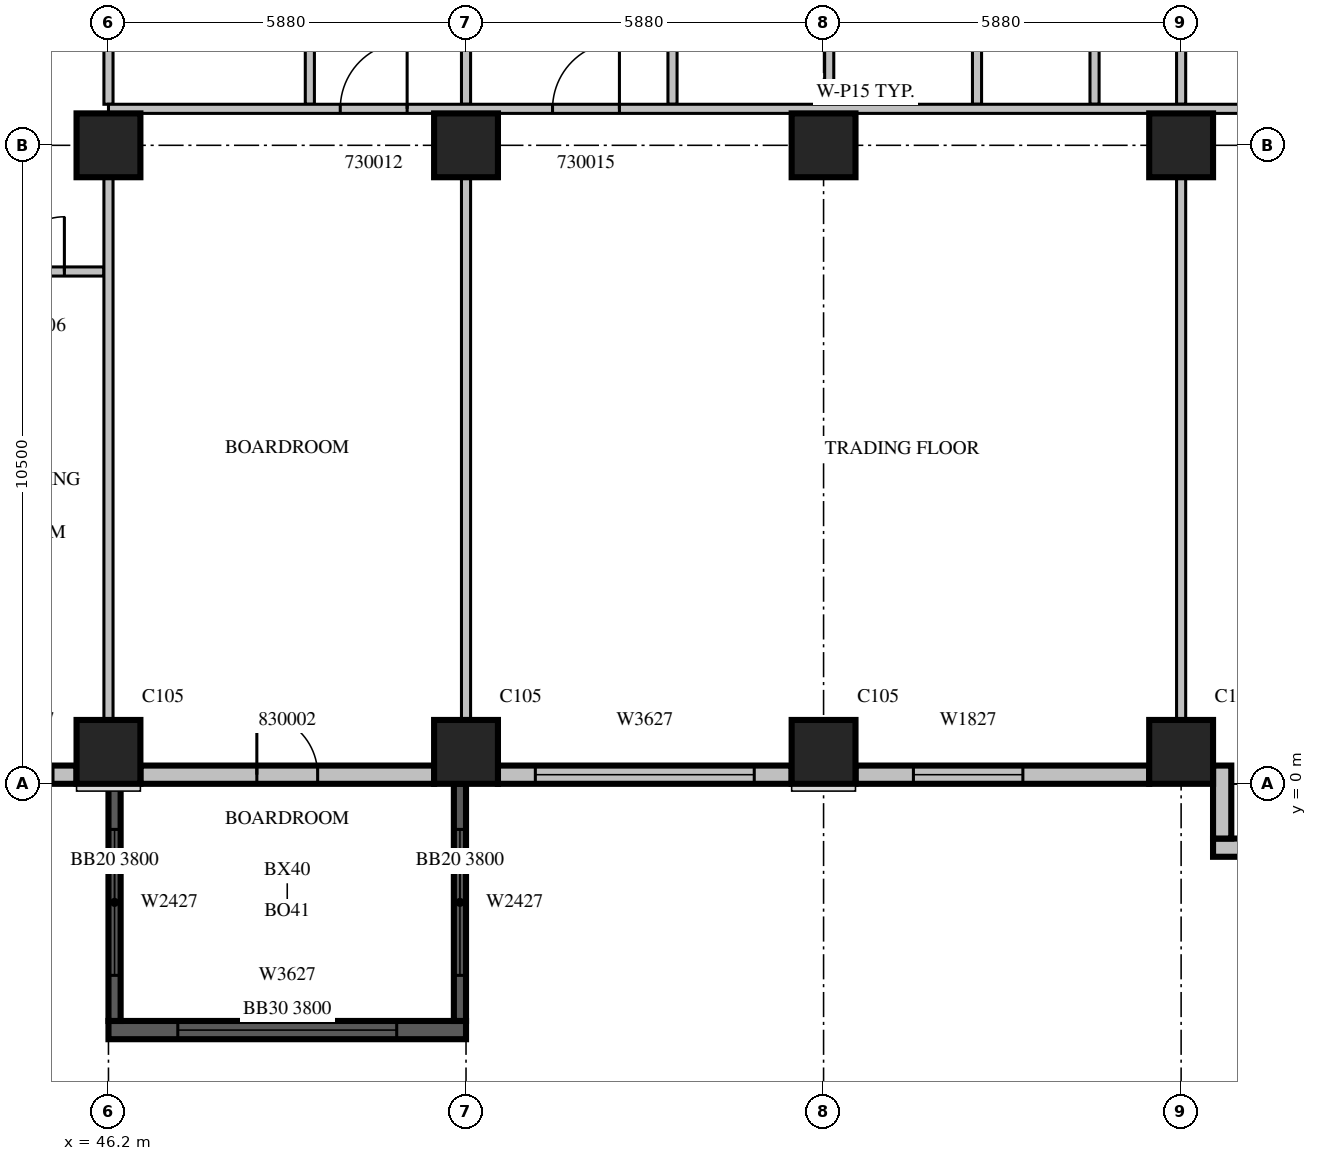
"""IFC4 building model, lengths in metres.
Left out: names, types, materials, properties, quantities, classifications, styles, units other than length and angle.
Written with IfcOpenShell. Run it as: python <this file> out.ifc"""

import sys

from ifc_helpers import new_model, si_unit, direction, frame, frame_2d, origin, origin_2d, place, context, subcontext, project, spatial, rectangle, extrude, source, transform, mapped, element, fill, save


model = new_model("IFC4")
c1 = context("Model", 3, precision=1e-05, world=origin(), true_north=direction((0.0, 1.0)))
c2 = subcontext(c1, "Body", "Model", "MODEL_VIEW")
j1 = project(units=[si_unit("LENGTHUNIT", "METRE"), si_unit("PLANEANGLEUNIT", "RADIAN")], contexts=[c1])
p1 = place(None, origin())
s1 = spatial("IfcSite", under=j1, at=p1, CompositionType="ELEMENT")
p2 = place(p1, origin())
s2 = spatial("IfcBuilding", under=s1, at=p2, CompositionType="ELEMENT")
p3 = place(p2, frame((0.0, 0.0, 137.1)))
s3 = spatial("IfcBuildingStorey", under=s2, at=p3, CompositionType="ELEMENT", Elevation=137.1)
m1 = source(origin(), c2, "Body", "SweptSolid", [
    extrude(rectangle(XDim=1.05, YDim=1.05, at=origin_2d()), origin(), (0.0, 0.0, 1.0), 4.2),
])
for number, where, z_axis, x_axis in (
    (1, (46.2, 0.525, 0.0), (0.0, 0.0, 1.0), (1.0, 0.0, 0.0)),
    (2, (52.08, 0.525, 0.0), (0.0, 0.0, 1.0), (1.0, 0.0, 0.0)),
    (3, (57.96, 0.525, 0.0), (0.0, 0.0, 1.0), (1.0, 0.0, 0.0)),
    (4, (63.84, 0.525, 0.0), (0.0, 0.0, 1.0), (1.0, 0.0, 0.0)),
    (5, (46.2, 10.5, 0.0), (0.0, 0.0, 1.0), (1.0, 0.0, 0.0)),
    (6, (52.08, 10.5, 0.0), (0.0, 0.0, 1.0), (1.0, 0.0, 0.0)),
    (7, (57.96, 10.5, 0.0), (0.0, 0.0, 1.0), (1.0, 0.0, 0.0)),
    (8, (63.84, 10.5, 0.0), (0.0, 0.0, 1.0), (1.0, 0.0, 0.0)),
):
    element("IfcColumn", number, at=place(p3, frame(where, z_axis=z_axis, x_axis=x_axis)), inside=s3, PredefinedType="COLUMN", context=c2, shape_type="MappedRepresentation", body=[
        mapped(m1, transform((0.0, 0.0, 0.0), scale=1.0)),
    ])
m2 = source(origin(), c2, "Body", "SweptSolid", [
    extrude(rectangle(XDim=5.88, YDim=0.3, at=frame_2d((2.94, 0.0))), origin(), (0.0, 0.0, 1.0), 3.8),
])
p4 = place(p3, frame((46.2, -4.05, 0.0), z_axis=(0.0, 0.0, 1.0), x_axis=(1.0, 0.0, 0.0)))
e9 = element("IfcWall", 9, at=p4, inside=s3, PredefinedType="SOLIDWALL", context=c2, shape_type="MappedRepresentation", body=[
    mapped(m2, transform((0.0, 0.0, 0.0), scale=1.0)),
])
m3 = source(origin(), c2, "Body", "SweptSolid", [
    extrude(rectangle(XDim=3.6, YDim=2.7, at=frame_2d((1.8, 1.35))), frame((0.0, 0.16, 0.0), z_axis=(0.0, -1.0, 0.0), x_axis=(1.0, 0.0, 0.0)), (0.0, 0.0, 1.0), 0.32),
])
p5 = place(p4, frame((1.14, 0.0, 0.6)))
e10 = element("IfcOpeningElement", 10, at=p5, cuts=e9, PredefinedType="OPENING", context=c2, shape_type="MappedRepresentation", body=[
    mapped(m3, transform((0.0, 0.0, 0.0), scale=1.0)),
])
m4 = source(origin(), c2, "Body", "SweptSolid", [
    extrude(rectangle(XDim=3.9, YDim=0.2, at=frame_2d((1.95, 0.0))), origin(), (0.0, 0.0, 1.0), 3.8),
])
p6 = place(p3, frame((46.3, 0.0, 0.0), z_axis=(0.0, 0.0, 1.0), x_axis=(0.0, -1.0, 0.0)))
e11 = element("IfcWall", 11, at=p6, inside=s3, PredefinedType="SOLIDWALL", context=c2, shape_type="MappedRepresentation", body=[
    mapped(m4, transform((0.0, 0.0, 0.0), scale=1.0)),
])
m5 = source(origin(), c2, "Body", "SweptSolid", [
    extrude(rectangle(XDim=2.4, YDim=2.7, at=frame_2d((1.2, 1.35))), frame((0.0, 0.11, 0.0), z_axis=(0.0, -1.0, 0.0), x_axis=(1.0, 0.0, 0.0)), (0.0, 0.0, 1.0), 0.22),
])
p7 = place(p6, frame((0.75, 0.0, 0.6)))
e12 = element("IfcOpeningElement", 12, at=p7, cuts=e11, PredefinedType="OPENING", context=c2, shape_type="MappedRepresentation", body=[
    mapped(m5, transform((0.0, 0.0, 0.0), scale=1.0)),
])
p8 = place(p3, frame((51.98, 0.0, 0.0), z_axis=(0.0, 0.0, 1.0), x_axis=(0.0, -1.0, 0.0)))
e13 = element("IfcWall", 13, at=p8, inside=s3, PredefinedType="SOLIDWALL", context=c2, shape_type="MappedRepresentation", body=[
    mapped(m4, transform((0.0, 0.0, 0.0), scale=1.0)),
])
p9 = place(p8, frame((0.75, 0.0, 0.6)))
e14 = element("IfcOpeningElement", 14, at=p9, cuts=e13, PredefinedType="OPENING", context=c2, shape_type="MappedRepresentation", body=[
    mapped(m5, transform((0.0, 0.0, 0.0), scale=1.0)),
])
m6 = source(origin(), c2, "Body", "SweptSolid", [
    extrude(rectangle(XDim=1.675, YDim=0.3, at=frame_2d((0.838, 0.0))), origin(), (0.0, 0.0, 1.0), 3.8),
])
p10 = place(p3, frame((44.0, 0.15, 0.0), z_axis=(0.0, 0.0, 1.0), x_axis=(1.0, 0.0, 0.0)))
e15 = element("IfcWall", 15, at=p10, inside=s3, PredefinedType="STANDARD", context=c2, shape_type="MappedRepresentation", body=[
    mapped(m6, transform((0.0, 0.0, 0.0), scale=1.0)),
])
m7 = source(origin(), c2, "Body", "SweptSolid", [
    extrude(rectangle(XDim=0.9, YDim=2.7, at=frame_2d((0.45, 1.35))), frame((0.0, 0.16, 0.0), z_axis=(0.0, -1.0, 0.0), x_axis=(1.0, 0.0, 0.0)), (0.0, 0.0, 1.0), 0.32),
])
p11 = place(p10, frame((0.388, 0.0, 0.6)))
e16 = element("IfcOpeningElement", 16, at=p11, cuts=e15, PredefinedType="OPENING", context=c2, shape_type="MappedRepresentation", body=[
    mapped(m7, transform((0.0, 0.0, 0.0), scale=1.0)),
])
m8 = source(origin(), c2, "Body", "SweptSolid", [
    extrude(rectangle(XDim=4.83, YDim=0.3, at=frame_2d((2.415, 0.0))), origin(), (0.0, 0.0, 1.0), 3.8),
])
p12 = place(p3, frame((46.725, 0.15, 0.0), z_axis=(0.0, 0.0, 1.0), x_axis=(1.0, 0.0, 0.0)))
e17 = element("IfcWall", 17, at=p12, inside=s3, PredefinedType="STANDARD", context=c2, shape_type="MappedRepresentation", body=[
    mapped(m8, transform((0.0, 0.0, 0.0), scale=1.0)),
])
m9 = source(origin(), c2, "Body", "SweptSolid", [
    extrude(rectangle(XDim=1.0, YDim=2.1, at=frame_2d((0.5, 1.05))), frame((0.0, 0.16, 0.0), z_axis=(0.0, -1.0, 0.0), x_axis=(1.0, 0.0, 0.0)), (0.0, 0.0, 1.0), 0.32),
])
p13 = place(p12, frame((1.915, 0.0, 0.0)))
e18 = element("IfcOpeningElement", 18, at=p13, cuts=e17, PredefinedType="OPENING", context=c2, shape_type="MappedRepresentation", body=[
    mapped(m9, transform((0.0, 0.0, 0.0), scale=1.0)),
])
p14 = place(p3, frame((52.605, 0.15, 0.0), z_axis=(0.0, 0.0, 1.0), x_axis=(1.0, 0.0, 0.0)))
e19 = element("IfcWall", 19, at=p14, inside=s3, PredefinedType="STANDARD", context=c2, shape_type="MappedRepresentation", body=[
    mapped(m8, transform((0.0, 0.0, 0.0), scale=1.0)),
])
p15 = place(p14, frame((0.615, 0.0, 0.6)))
e20 = element("IfcOpeningElement", 20, at=p15, cuts=e19, PredefinedType="OPENING", context=c2, shape_type="MappedRepresentation", body=[
    mapped(m3, transform((0.0, 0.0, 0.0), scale=1.0)),
])
p16 = place(p3, frame((58.485, 0.15, 0.0), z_axis=(0.0, 0.0, 1.0), x_axis=(1.0, 0.0, 0.0)))
e21 = element("IfcWall", 21, at=p16, inside=s3, PredefinedType="STANDARD", context=c2, shape_type="MappedRepresentation", body=[
    mapped(m8, transform((0.0, 0.0, 0.0), scale=1.0)),
])
m10 = source(origin(), c2, "Body", "SweptSolid", [
    extrude(rectangle(XDim=1.8, YDim=2.7, at=frame_2d((0.9, 1.35))), frame((0.0, 0.16, 0.0), z_axis=(0.0, -1.0, 0.0), x_axis=(1.0, 0.0, 0.0)), (0.0, 0.0, 1.0), 0.32),
])
p17 = place(p16, frame((0.953, 0.0, 0.6)))
e22 = element("IfcOpeningElement", 22, at=p17, cuts=e21, PredefinedType="OPENING", context=c2, shape_type="MappedRepresentation", body=[
    mapped(m10, transform((0.0, 0.0, 0.0), scale=1.0)),
])
m11 = source(origin(), c2, "Body", "SweptSolid", [
    extrude(rectangle(XDim=2.835, YDim=0.3, at=frame_2d((1.417, 0.0))), origin(), (0.0, 0.0, 1.0), 3.8),
])
p18 = place(p3, frame((64.365, -1.05, 0.0), z_axis=(0.0, 0.0, 1.0), x_axis=(1.0, 0.0, 0.0)))
e23 = element("IfcWall", 23, at=p18, inside=s3, PredefinedType="STANDARD", context=c2, shape_type="MappedRepresentation", body=[
    mapped(m11, transform((0.0, 0.0, 0.0), scale=1.0)),
])
p19 = place(p18, frame((0.618, 0.0, 0.6)))
e24 = element("IfcOpeningElement", 24, at=p19, cuts=e23, PredefinedType="OPENING", context=c2, shape_type="MappedRepresentation", body=[
    mapped(m10, transform((0.0, 0.0, 0.0), scale=1.0)),
])
m12 = source(origin(), c2, "Body", "SweptSolid", [
    extrude(rectangle(XDim=1.2, YDim=0.3, at=frame_2d((0.6, 0.0))), origin(), (0.0, 0.0, 1.0), 3.8),
])
p20 = place(p3, frame((64.515, 0.3, 0.0), z_axis=(0.0, 0.0, 1.0), x_axis=(0.0, -1.0, 0.0)))
e25 = element("IfcWall", 25, at=p20, inside=s3, PredefinedType="STANDARD", context=c2, shape_type="MappedRepresentation", body=[
    mapped(m12, transform((0.0, 0.0, 0.0), scale=1.0)),
])
m13 = source(origin(), c2, "Body", "SweptSolid", [
    extrude(rectangle(XDim=2.2, YDim=0.15, at=frame_2d((1.1, 0.0))), origin(), (0.0, 0.0, 1.0), 3.8),
])
p21 = place(p3, frame((46.125, 8.425, 0.0), z_axis=(0.0, 0.0, 1.0), x_axis=(-1.0, 0.0, 0.0)))
e26 = element("IfcWall", 26, at=p21, inside=s3, PredefinedType="PARTITIONING", context=c2, shape_type="MappedRepresentation", body=[
    mapped(m13, transform((0.0, 0.0, 0.0), scale=1.0)),
])
m14 = source(origin(), c2, "Body", "SweptSolid", [
    extrude(rectangle(XDim=0.9, YDim=2.1, at=frame_2d((0.45, 1.05))), frame((0.0, 0.085, 0.0), z_axis=(0.0, -1.0, 0.0), x_axis=(1.0, 0.0, 0.0)), (0.0, 0.0, 1.0), 0.17),
])
p22 = place(p21, frame((0.65, 0.0, 0.0)))
e27 = element("IfcOpeningElement", 27, at=p22, cuts=e26, PredefinedType="OPENING", context=c2, shape_type="MappedRepresentation", body=[
    mapped(m14, transform((0.0, 0.0, 0.0), scale=1.0)),
])
m15 = source(origin(), c2, "Body", "SweptSolid", [
    extrude(rectangle(XDim=3.525, YDim=0.15, at=frame_2d((1.762, 0.0))), origin(), (0.0, 0.0, 1.0), 3.8),
])
for number, where, z_axis, x_axis in (
    (28, (49.512, 11.175, 0.0), (0.0, 0.0, 1.0), (0.0, 1.0, 0.0)),
    (29, (55.476, 11.175, 0.0), (0.0, 0.0, 1.0), (0.0, 1.0, 0.0)),
    (30, (58.053, 11.175, 0.0), (0.0, 0.0, 1.0), (0.0, 1.0, 0.0)),
    (31, (60.483, 11.175, 0.0), (0.0, 0.0, 1.0), (0.0, 1.0, 0.0)),
    (32, (62.416, 11.175, 0.0), (0.0, 0.0, 1.0), (0.0, 1.0, 0.0)),
):
    element("IfcWall", number, at=place(p3, frame(where, z_axis=z_axis, x_axis=x_axis)), inside=s3, PredefinedType="PARTITIONING", context=c2, shape_type="MappedRepresentation", body=[
        mapped(m15, transform((0.0, 0.0, 0.0), scale=1.0)),
    ])
m16 = source(origin(), c2, "Body", "SweptSolid", [
    extrude(rectangle(XDim=8.927, YDim=0.15, at=frame_2d((4.463, 0.0))), origin(), (0.0, 0.0, 1.0), 3.8),
])
p23 = place(p3, frame((46.2, 1.049, 0.0), z_axis=(0.0, 0.0, 1.0), x_axis=(0.0, 1.0, 0.0)))
e33 = element("IfcWall", 33, at=p23, inside=s3, PredefinedType="PARTITIONING", context=c2, shape_type="MappedRepresentation", body=[
    mapped(m16, transform((0.0, 0.0, 0.0), scale=1.0)),
])
p24 = place(p3, frame((46.2, 11.175, 0.0), z_axis=(0.0, 0.0, 1.0), x_axis=(0.0, 1.0, 0.0)))
e34 = element("IfcWall", 34, at=p24, inside=s3, PredefinedType="PARTITIONING", context=c2, shape_type="MappedRepresentation", body=[
    mapped(m15, transform((0.0, 0.0, 0.0), scale=1.0)),
])
p25 = place(p3, frame((52.08, 1.049, 0.0), z_axis=(0.0, 0.0, 1.0), x_axis=(0.0, 1.0, 0.0)))
e35 = element("IfcWall", 35, at=p25, inside=s3, PredefinedType="PARTITIONING", context=c2, shape_type="MappedRepresentation", body=[
    mapped(m16, transform((0.0, 0.0, 0.0), scale=1.0)),
])
p26 = place(p3, frame((52.08, 11.175, 0.0), z_axis=(0.0, 0.0, 1.0), x_axis=(0.0, 1.0, 0.0)))
e36 = element("IfcWall", 36, at=p26, inside=s3, PredefinedType="PARTITIONING", context=c2, shape_type="MappedRepresentation", body=[
    mapped(m15, transform((0.0, 0.0, 0.0), scale=1.0)),
])
p27 = place(p3, frame((63.84, 1.049, 0.0), z_axis=(0.0, 0.0, 1.0), x_axis=(0.0, 1.0, 0.0)))
e37 = element("IfcWall", 37, at=p27, inside=s3, PredefinedType="PARTITIONING", context=c2, shape_type="MappedRepresentation", body=[
    mapped(m16, transform((0.0, 0.0, 0.0), scale=1.0)),
])
p28 = place(p3, frame((63.84, 11.175, 0.0), z_axis=(0.0, 0.0, 1.0), x_axis=(0.0, 1.0, 0.0)))
e38 = element("IfcWall", 38, at=p28, inside=s3, PredefinedType="PARTITIONING", context=c2, shape_type="MappedRepresentation", body=[
    mapped(m15, transform((0.0, 0.0, 0.0), scale=1.0)),
])
m17 = source(origin(), c2, "Body", "SweptSolid", [
    extrude(rectangle(XDim=24.9, YDim=0.15, at=frame_2d((12.45, 0.0))), origin(), (0.0, 0.0, 1.0), 3.8),
])
p29 = place(p3, frame((71.1, 11.1, 0.0), z_axis=(0.0, 0.0, 1.0), x_axis=(-1.0, 0.0, 0.0)))
e39 = element("IfcWall", 39, at=p29, inside=s3, PredefinedType="PARTITIONING", context=c2, shape_type="MappedRepresentation", body=[
    mapped(m17, transform((0.0, 0.0, 0.0), scale=1.0)),
])
m18 = source(origin(), c2, "Body", "SweptSolid", [
    extrude(rectangle(XDim=1.1, YDim=2.1, at=frame_2d((0.55, 1.05))), frame((0.0, 0.085, 0.0), z_axis=(0.0, -1.0, 0.0), x_axis=(1.0, 0.0, 0.0)), (0.0, 0.0, 1.0), 0.17),
])
p30 = place(p29, frame((19.988, 0.0, 0.0)))
e40 = element("IfcOpeningElement", 40, at=p30, cuts=e39, PredefinedType="OPENING", context=c2, shape_type="MappedRepresentation", body=[
    mapped(m18, transform((0.0, 0.0, 0.0), scale=1.0)),
])
p31 = place(p29, frame((16.497, 0.0, 0.0)))
e41 = element("IfcOpeningElement", 41, at=p31, cuts=e39, PredefinedType="OPENING", context=c2, shape_type="MappedRepresentation", body=[
    mapped(m18, transform((0.0, 0.0, 0.0), scale=1.0)),
])
p32 = place(p29, frame((2.028, 0.0, 0.0)))
e42 = element("IfcOpeningElement", 42, at=p32, cuts=e39, PredefinedType="OPENING", context=c2, shape_type="MappedRepresentation", body=[
    mapped(m14, transform((0.0, 0.0, 0.0), scale=1.0)),
])
m19 = source(origin(), c2, "Body", "SweptSolid", [
    extrude(rectangle(XDim=3.6, YDim=2.7, at=frame_2d((1.8, 1.35))), frame((0.0, 0.03, 0.0), z_axis=(0.0, -1.0, 0.0), x_axis=(1.0, 0.0, 0.0)), (0.0, 0.0, 1.0), 0.06),
])
p33 = place(p5, origin())
e43 = element("IfcWindow", 43, at=p33, inside=s3, PartitioningType="SINGLE_PANEL", PredefinedType="WINDOW", context=c2, shape_type="MappedRepresentation", body=[
    mapped(m19, transform((0.0, 0.0, 0.0), scale=1.0)),
])
fill(e10, e43)
m20 = source(origin(), c2, "Body", "SweptSolid", [
    extrude(rectangle(XDim=2.4, YDim=2.7, at=frame_2d((1.2, 1.35))), frame((0.0, 0.03, 0.0), z_axis=(0.0, -1.0, 0.0), x_axis=(1.0, 0.0, 0.0)), (0.0, 0.0, 1.0), 0.06),
])
p34 = place(p7, origin())
e44 = element("IfcWindow", 44, at=p34, inside=s3, PartitioningType="SINGLE_PANEL", PredefinedType="WINDOW", context=c2, shape_type="MappedRepresentation", body=[
    mapped(m20, transform((0.0, 0.0, 0.0), scale=1.0)),
])
fill(e12, e44)
p35 = place(p9, origin())
e45 = element("IfcWindow", 45, at=p35, inside=s3, PartitioningType="SINGLE_PANEL", PredefinedType="WINDOW", context=c2, shape_type="MappedRepresentation", body=[
    mapped(m20, transform((0.0, 0.0, 0.0), scale=1.0)),
])
fill(e14, e45)
m21 = source(origin(), c2, "Body", "SweptSolid", [
    extrude(rectangle(XDim=0.9, YDim=2.7, at=frame_2d((0.45, 1.35))), frame((0.0, 0.03, 0.0), z_axis=(0.0, -1.0, 0.0), x_axis=(1.0, 0.0, 0.0)), (0.0, 0.0, 1.0), 0.06),
])
p36 = place(p11, origin())
e46 = element("IfcWindow", 46, at=p36, inside=s3, PartitioningType="SINGLE_PANEL", PredefinedType="WINDOW", context=c2, shape_type="MappedRepresentation", body=[
    mapped(m21, transform((0.0, 0.0, 0.0), scale=1.0)),
])
fill(e16, e46)
p37 = place(p15, origin())
e47 = element("IfcWindow", 47, at=p37, inside=s3, PartitioningType="SINGLE_PANEL", PredefinedType="WINDOW", context=c2, shape_type="MappedRepresentation", body=[
    mapped(m19, transform((0.0, 0.0, 0.0), scale=1.0)),
])
fill(e20, e47)
m22 = source(origin(), c2, "Body", "SweptSolid", [
    extrude(rectangle(XDim=1.8, YDim=2.7, at=frame_2d((0.9, 1.35))), frame((0.0, 0.03, 0.0), z_axis=(0.0, -1.0, 0.0), x_axis=(1.0, 0.0, 0.0)), (0.0, 0.0, 1.0), 0.06),
])
p38 = place(p17, origin())
e48 = element("IfcWindow", 48, at=p38, inside=s3, PartitioningType="SINGLE_PANEL", PredefinedType="WINDOW", context=c2, shape_type="MappedRepresentation", body=[
    mapped(m22, transform((0.0, 0.0, 0.0), scale=1.0)),
])
fill(e22, e48)
m23 = source(origin(), c2, "Body", "SweptSolid", [
    extrude(rectangle(XDim=0.9, YDim=2.1, at=frame_2d((0.45, 1.05))), frame((0.0, 0.025, 0.0), z_axis=(0.0, -1.0, 0.0), x_axis=(1.0, 0.0, 0.0)), (0.0, 0.0, 1.0), 0.05),
])
p39 = place(p22, origin())
e49 = element("IfcDoor", 49, at=p39, inside=s3, OperationType="SINGLE_SWING_RIGHT", PredefinedType="DOOR", context=c2, shape_type="MappedRepresentation", body=[
    mapped(m23, transform((0.0, 0.0, 0.0), scale=1.0)),
])
fill(e27, e49)
m24 = source(origin(), c2, "Body", "SweptSolid", [
    extrude(rectangle(XDim=1.1, YDim=2.1, at=frame_2d((0.55, 1.05))), frame((0.0, 0.025, 0.0), z_axis=(0.0, -1.0, 0.0), x_axis=(1.0, 0.0, 0.0)), (0.0, 0.0, 1.0), 0.05),
])
p40 = place(p30, origin())
e50 = element("IfcDoor", 50, at=p40, inside=s3, OperationType="SINGLE_SWING_RIGHT", PredefinedType="DOOR", context=c2, shape_type="MappedRepresentation", body=[
    mapped(m24, transform((0.0, 0.0, 0.0), scale=1.0)),
])
fill(e40, e50)
p41 = place(p31, origin())
e51 = element("IfcDoor", 51, at=p41, inside=s3, OperationType="SINGLE_SWING_RIGHT", PredefinedType="DOOR", context=c2, shape_type="MappedRepresentation", body=[
    mapped(m24, transform((0.0, 0.0, 0.0), scale=1.0)),
])
fill(e41, e51)
m25 = source(origin(), c2, "Body", "SweptSolid", [
    extrude(rectangle(XDim=1.0, YDim=2.1, at=frame_2d((0.5, 1.05))), frame((0.0, 0.025, 0.0), z_axis=(0.0, -1.0, 0.0), x_axis=(1.0, 0.0, 0.0)), (0.0, 0.0, 1.0), 0.05),
])
p42 = place(p13, origin())
e52 = element("IfcDoor", 52, at=p42, inside=s3, OperationType="SINGLE_SWING_LEFT", PredefinedType="DOOR", context=c2, shape_type="MappedRepresentation", body=[
    mapped(m25, transform((0.0, 0.0, 0.0), scale=1.0)),
])
fill(e18, e52)
save(model, sys.argv[1])
